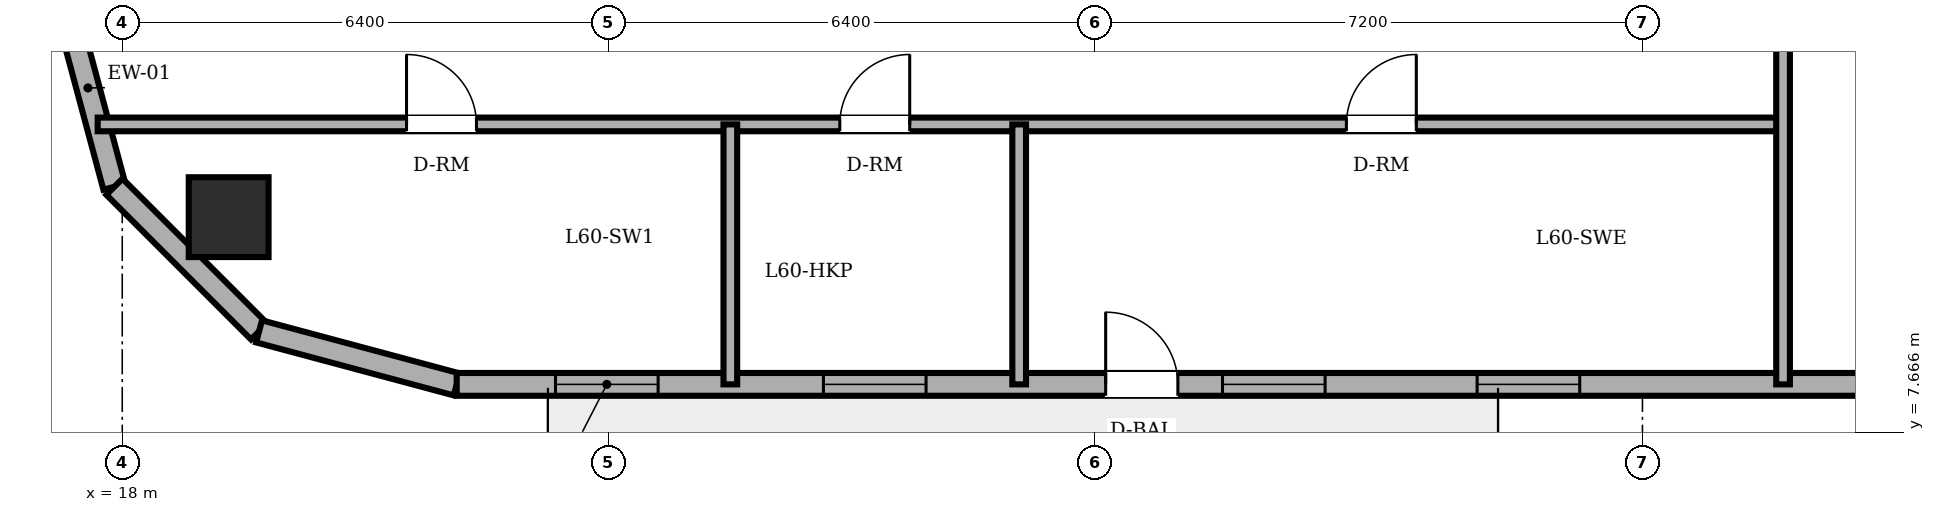
"""IFC4 building model, lengths in metres.
Left out: names, types, materials, properties, quantities, classifications, styles, units other than length and angle.
Written with IfcOpenShell. Run it as: python <this file> out.ifc"""

import sys

from ifc_helpers import new_model, si_unit, direction, frame, frame_2d, origin, origin_2d, place, context, subcontext, project, spatial, rectangle, circle, extrude, element, fill, save


model = new_model("IFC4")
c1 = context("Model", 3, precision=1e-05, world=origin(), true_north=direction((0.0, 1.0)))
c2 = subcontext(c1, "Body", "Model", "MODEL_VIEW")
j1 = project(units=[si_unit("LENGTHUNIT", "METRE"), si_unit("PLANEANGLEUNIT", "RADIAN")], contexts=[c1])
p1 = place(None, origin())
s1 = spatial("IfcSite", under=j1, at=p1, CompositionType="ELEMENT")
p2 = place(p1, origin())
s2 = spatial("IfcBuilding", under=s1, at=p2, CompositionType="ELEMENT")
p3 = place(p2, frame((0.0, 0.0, 230.1)))
s3 = spatial("IfcBuildingStorey", under=s2, at=p3, CompositionType="ELEMENT", Elevation=230.1)
p4 = place(p3, frame((19.4, 10.5, 0.0), z_axis=(0.0, 0.0, 1.0), x_axis=(1.0, 0.0, 0.0)))
e1 = element("IfcColumn", 1, at=p4, inside=s3, PredefinedType="COLUMN", context=c2, shape_type="SweptSolid", body=[
    extrude(circle(Radius=0.525, at=origin_2d()), origin(), (0.0, 0.0, 1.0), 3.6),
])
p5 = place(p3, frame((17.2, 13.5, 0.0), z_axis=(0.0, 0.0, 1.0), x_axis=(0.258932525951, -0.965895412042, 0.0)))
e2 = element("IfcWall", 2, at=p5, inside=s3, PredefinedType="SOLIDWALL", context=c2, shape_type="SweptSolid", body=[
    extrude(rectangle(XDim=2.692, YDim=0.3, at=frame_2d((1.346, 0.0))), origin(), (0.0, 0.0, 1.0), 3.4),
])
p6 = place(p3, frame((17.897, 10.9, 0.0), z_axis=(0.0, 0.0, 1.0), x_axis=(0.707152139074, -0.70706142039, 0.0)))
e3 = element("IfcWall", 3, at=p6, inside=s3, PredefinedType="SOLIDWALL", context=c2, shape_type="SweptSolid", body=[
    extrude(rectangle(XDim=2.691, YDim=0.3, at=frame_2d((1.346, 0.0))), origin(), (0.0, 0.0, 1.0), 3.4),
])
p7 = place(p3, frame((19.8, 8.997, 0.0), z_axis=(0.0, 0.0, 1.0), x_axis=(0.965889330541, -0.258955210695, 0.0)))
e4 = element("IfcWall", 4, at=p7, inside=s3, PredefinedType="SOLIDWALL", context=c2, shape_type="SweptSolid", body=[
    extrude(rectangle(XDim=2.692, YDim=0.3, at=frame_2d((1.346, 0.0))), origin(), (0.0, 0.0, 1.0), 3.4),
])
p8 = place(p3, frame((22.4, 8.3, 0.0), z_axis=(0.0, 0.0, 1.0), x_axis=(1.0, 0.0, 0.0)))
e5 = element("IfcWall", 5, at=p8, inside=s3, PredefinedType="SOLIDWALL", context=c2, shape_type="SweptSolid", body=[
    extrude(rectangle(XDim=32.485, YDim=0.3, at=frame_2d((16.243, 0.0))), origin(), (0.0, 0.0, 1.0), 3.4),
])
p9 = place(p8, frame((8.538, 0.0, 0.0)))
e6 = element("IfcOpeningElement", 6, at=p9, cuts=e5, PredefinedType="OPENING", context=c2, shape_type="SweptSolid", body=[
    extrude(rectangle(XDim=0.95, YDim=2.2, at=frame_2d((0.475, 1.1))), frame((0.0, 0.16, 0.0), z_axis=(0.0, -1.0, 0.0), x_axis=(1.0, 0.0, 0.0)), (0.0, 0.0, 1.0), 0.32),
])
p10 = place(p8, frame((1.3, 0.0, 0.85)))
e7 = element("IfcOpeningElement", 7, at=p10, cuts=e5, PredefinedType="OPENING", context=c2, shape_type="SweptSolid", body=[
    extrude(rectangle(XDim=1.35, YDim=1.55, at=frame_2d((0.675, 0.775))), frame((0.0, 0.16, 0.0), z_axis=(0.0, -1.0, 0.0), x_axis=(1.0, 0.0, 0.0)), (0.0, 0.0, 1.0), 0.32),
])
p11 = place(p8, frame((4.825, 0.0, 0.85)))
e8 = element("IfcOpeningElement", 8, at=p11, cuts=e5, PredefinedType="OPENING", context=c2, shape_type="SweptSolid", body=[
    extrude(rectangle(XDim=1.35, YDim=1.55, at=frame_2d((0.675, 0.775))), frame((0.0, 0.16, 0.0), z_axis=(0.0, -1.0, 0.0), x_axis=(1.0, 0.0, 0.0)), (0.0, 0.0, 1.0), 0.32),
])
p12 = place(p8, frame((10.075, 0.0, 0.85)))
e9 = element("IfcOpeningElement", 9, at=p12, cuts=e5, PredefinedType="OPENING", context=c2, shape_type="SweptSolid", body=[
    extrude(rectangle(XDim=1.35, YDim=1.55, at=frame_2d((0.675, 0.775))), frame((0.0, 0.16, 0.0), z_axis=(0.0, -1.0, 0.0), x_axis=(1.0, 0.0, 0.0)), (0.0, 0.0, 1.0), 0.32),
])
p13 = place(p8, frame((13.425, 0.0, 0.85)))
e10 = element("IfcOpeningElement", 10, at=p13, cuts=e5, PredefinedType="OPENING", context=c2, shape_type="SweptSolid", body=[
    extrude(rectangle(XDim=1.35, YDim=1.55, at=frame_2d((0.675, 0.775))), frame((0.0, 0.16, 0.0), z_axis=(0.0, -1.0, 0.0), x_axis=(1.0, 0.0, 0.0)), (0.0, 0.0, 1.0), 0.32),
])
p14 = place(p8, frame((21.67, 0.0, 0.85)))
e11 = element("IfcOpeningElement", 11, at=p14, cuts=e5, PredefinedType="OPENING", context=c2, shape_type="SweptSolid", body=[
    extrude(rectangle(XDim=1.35, YDim=1.55, at=frame_2d((0.675, 0.775))), frame((0.0, 0.16, 0.0), z_axis=(0.0, -1.0, 0.0), x_axis=(1.0, 0.0, 0.0)), (0.0, 0.0, 1.0), 0.32),
])
p15 = place(p8, frame((26.565, 0.0, 0.85)))
e12 = element("IfcOpeningElement", 12, at=p15, cuts=e5, PredefinedType="OPENING", context=c2, shape_type="SweptSolid", body=[
    extrude(rectangle(XDim=1.35, YDim=1.55, at=frame_2d((0.675, 0.775))), frame((0.0, 0.16, 0.0), z_axis=(0.0, -1.0, 0.0), x_axis=(1.0, 0.0, 0.0)), (0.0, 0.0, 1.0), 0.32),
])
p16 = place(p3, frame((17.677, 11.72, 0.0), z_axis=(0.0, 0.0, 1.0), x_axis=(1.0, 0.0, 0.0)))
e13 = element("IfcWall", 13, at=p16, inside=s3, PredefinedType="PARTITIONING", context=c2, shape_type="SweptSolid", body=[
    extrude(rectangle(XDim=22.173, YDim=0.18, at=frame_2d((11.086, 0.0))), origin(), (0.0, 0.0, 1.0), 3.4),
])
p17 = place(p16, frame((9.763, 0.0, 0.0)))
e14 = element("IfcOpeningElement", 14, at=p17, cuts=e13, PredefinedType="OPENING", context=c2, shape_type="SweptSolid", body=[
    extrude(rectangle(XDim=0.92, YDim=2.1, at=frame_2d((0.46, 1.05))), frame((0.0, 0.1, 0.0), z_axis=(0.0, -1.0, 0.0), x_axis=(1.0, 0.0, 0.0)), (0.0, 0.0, 1.0), 0.2),
])
p18 = place(p16, frame((4.063, 0.0, 0.0)))
e15 = element("IfcOpeningElement", 15, at=p18, cuts=e13, PredefinedType="OPENING", context=c2, shape_type="SweptSolid", body=[
    extrude(rectangle(XDim=0.92, YDim=2.1, at=frame_2d((0.46, 1.05))), frame((0.0, 0.1, 0.0), z_axis=(0.0, -1.0, 0.0), x_axis=(1.0, 0.0, 0.0)), (0.0, 0.0, 1.0), 0.2),
])
p19 = place(p16, frame((16.428, 0.0, 0.0)))
e16 = element("IfcOpeningElement", 16, at=p19, cuts=e13, PredefinedType="OPENING", context=c2, shape_type="SweptSolid", body=[
    extrude(rectangle(XDim=0.92, YDim=2.1, at=frame_2d((0.46, 1.05))), frame((0.0, 0.1, 0.0), z_axis=(0.0, -1.0, 0.0), x_axis=(1.0, 0.0, 0.0)), (0.0, 0.0, 1.0), 0.2),
])
for number, where, z_axis, x_axis in (
    (17, (26.0, 8.3, 0.0), (0.0, 0.0, 1.0), (0.0, 1.0, 0.0)),
    (18, (29.8, 8.3, 0.0), (0.0, 0.0, 1.0), (0.0, 1.0, 0.0)),
):
    element("IfcWall", number, at=place(p3, frame(where, z_axis=z_axis, x_axis=x_axis)), inside=s3, PredefinedType="PARTITIONING", context=c2, shape_type="SweptSolid", body=[
        extrude(rectangle(XDim=3.42, YDim=0.18, at=frame_2d((1.71, 0.0))), origin(), (0.0, 0.0, 1.0), 3.4),
    ])
p20 = place(p3, frame((39.85, 8.3, 0.0), z_axis=(0.0, 0.0, 1.0), x_axis=(0.0, 1.0, 0.0)))
e19 = element("IfcWall", 19, at=p20, inside=s3, PredefinedType="PARTITIONING", context=c2, shape_type="SweptSolid", body=[
    extrude(rectangle(XDim=14.52, YDim=0.18, at=frame_2d((7.26, 0.0))), origin(), (0.0, 0.0, 1.0), 3.4),
])
p21 = place(p9, origin())
e20 = element("IfcDoor", 20, at=p21, inside=s3, OperationType="SINGLE_SWING_LEFT", PredefinedType="DOOR", context=c2, shape_type="SweptSolid", body=[
    extrude(rectangle(XDim=0.95, YDim=2.2, at=frame_2d((0.475, 1.1))), frame((0.0, 0.025, 0.0), z_axis=(0.0, -1.0, 0.0), x_axis=(1.0, 0.0, 0.0)), (0.0, 0.0, 1.0), 0.05),
])
fill(e6, e20)
p22 = place(p10, origin())
e21 = element("IfcWindow", 21, at=p22, inside=s3, PartitioningType="SINGLE_PANEL", PredefinedType="WINDOW", context=c2, shape_type="SweptSolid", body=[
    extrude(rectangle(XDim=1.35, YDim=1.55, at=frame_2d((0.675, 0.775))), frame((0.0, 0.03, 0.0), z_axis=(0.0, -1.0, 0.0), x_axis=(1.0, 0.0, 0.0)), (0.0, 0.0, 1.0), 0.06),
])
fill(e7, e21)
p23 = place(p11, origin())
e22 = element("IfcWindow", 22, at=p23, inside=s3, PartitioningType="SINGLE_PANEL", PredefinedType="WINDOW", context=c2, shape_type="SweptSolid", body=[
    extrude(rectangle(XDim=1.35, YDim=1.55, at=frame_2d((0.675, 0.775))), frame((0.0, 0.03, 0.0), z_axis=(0.0, -1.0, 0.0), x_axis=(1.0, 0.0, 0.0)), (0.0, 0.0, 1.0), 0.06),
])
fill(e8, e22)
p24 = place(p12, origin())
e23 = element("IfcWindow", 23, at=p24, inside=s3, PartitioningType="SINGLE_PANEL", PredefinedType="WINDOW", context=c2, shape_type="SweptSolid", body=[
    extrude(rectangle(XDim=1.35, YDim=1.55, at=frame_2d((0.675, 0.775))), frame((0.0, 0.03, 0.0), z_axis=(0.0, -1.0, 0.0), x_axis=(1.0, 0.0, 0.0)), (0.0, 0.0, 1.0), 0.06),
])
fill(e9, e23)
p25 = place(p13, origin())
e24 = element("IfcWindow", 24, at=p25, inside=s3, PartitioningType="SINGLE_PANEL", PredefinedType="WINDOW", context=c2, shape_type="SweptSolid", body=[
    extrude(rectangle(XDim=1.35, YDim=1.55, at=frame_2d((0.675, 0.775))), frame((0.0, 0.03, 0.0), z_axis=(0.0, -1.0, 0.0), x_axis=(1.0, 0.0, 0.0)), (0.0, 0.0, 1.0), 0.06),
])
fill(e10, e24)
p26 = place(p17, origin())
e25 = element("IfcDoor", 25, at=p26, inside=s3, OperationType="SINGLE_SWING_RIGHT", PredefinedType="DOOR", context=c2, shape_type="SweptSolid", body=[
    extrude(rectangle(XDim=0.92, YDim=2.1, at=frame_2d((0.46, 1.05))), frame((0.0, 0.025, 0.0), z_axis=(0.0, -1.0, 0.0), x_axis=(1.0, 0.0, 0.0)), (0.0, 0.0, 1.0), 0.05),
])
fill(e14, e25)
p27 = place(p18, origin())
e26 = element("IfcDoor", 26, at=p27, inside=s3, OperationType="SINGLE_SWING_LEFT", PredefinedType="DOOR", context=c2, shape_type="SweptSolid", body=[
    extrude(rectangle(XDim=0.92, YDim=2.1, at=frame_2d((0.46, 1.05))), frame((0.0, 0.025, 0.0), z_axis=(0.0, -1.0, 0.0), x_axis=(1.0, 0.0, 0.0)), (0.0, 0.0, 1.0), 0.05),
])
fill(e15, e26)
p28 = place(p19, origin())
e27 = element("IfcDoor", 27, at=p28, inside=s3, OperationType="SINGLE_SWING_RIGHT", PredefinedType="DOOR", context=c2, shape_type="SweptSolid", body=[
    extrude(rectangle(XDim=0.92, YDim=2.1, at=frame_2d((0.46, 1.05))), frame((0.0, 0.025, 0.0), z_axis=(0.0, -1.0, 0.0), x_axis=(1.0, 0.0, 0.0)), (0.0, 0.0, 1.0), 0.05),
])
fill(e16, e27)
save(model, sys.argv[1])
